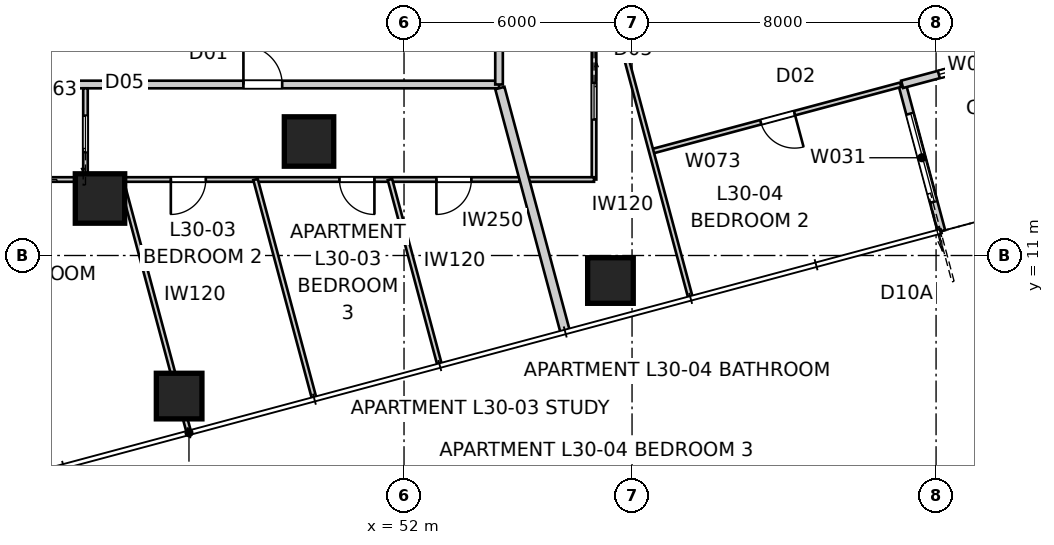
"""IFC4 building model, lengths in metres.
Left out: names, types, materials, properties, quantities, classifications, styles, units other than length and angle.
Written with IfcOpenShell. Run it as: python <this file> out.ifc"""

import sys

from ifc_helpers import new_model, si_unit, direction, frame, frame_2d, origin, origin_2d, place, context, subcontext, project, spatial, rectangle, extrude, element, fill, save


model = new_model("IFC4")
c1 = context("Model", 3, precision=1e-05, world=origin(), true_north=direction((0.0, 1.0)))
c2 = subcontext(c1, "Body", "Model", "MODEL_VIEW")
j1 = project(units=[si_unit("LENGTHUNIT", "METRE"), si_unit("PLANEANGLEUNIT", "RADIAN")], contexts=[c1])
p1 = place(None, origin())
s1 = spatial("IfcSite", under=j1, at=p1, CompositionType="ELEMENT")
p2 = place(p1, origin())
s2 = spatial("IfcBuilding", under=s1, at=p2, CompositionType="ELEMENT")
p3 = place(p2, frame((0.0, 0.0, 111.6)))
s3 = spatial("IfcBuildingStorey", under=s2, at=p3, CompositionType="ELEMENT", Elevation=111.6)
for number, where, z_axis, x_axis in (
    (1, (46.082, 7.301, -0.15), (0.0, 0.0, 1.0), (1.0, 0.0, 0.0)),
    (2, (57.432, 10.342, -0.15), (0.0, 0.0, 1.0), (1.0, 0.0, 0.0)),
):
    element("IfcColumn", number, at=place(p3, frame(where, z_axis=z_axis, x_axis=x_axis)), inside=s3, PredefinedType="COLUMN", context=c2, shape_type="SweptSolid", body=[
        extrude(rectangle(XDim=1.2, YDim=1.2, at=origin_2d()), origin(), (0.0, 0.0, 1.0), 3.55),
    ])
for number, where, z_axis, x_axis in (
    (3, (44.0, 12.5, 0.0), (0.0, 0.0, 1.0), (1.0, 0.0, 0.0)),
    (4, (49.5, 14.0, 0.0), (0.0, 0.0, 1.0), (1.0, 0.0, 0.0)),
):
    element("IfcColumn", number, at=place(p3, frame(where, z_axis=z_axis, x_axis=x_axis)), inside=s3, PredefinedType="COLUMN", context=c2, shape_type="SweptSolid", body=[
        extrude(rectangle(XDim=1.3, YDim=1.3, at=origin_2d()), origin(), (0.0, 0.0, 1.0), 3.4),
    ])
p4 = place(p3, frame((66.143, 11.641, 0.0), z_axis=(0.0, 0.0, 1.0), x_axis=(-0.258843877716, 0.965919172068, 0.0)))
e5 = element("IfcWall", 5, at=p4, inside=s3, PredefinedType="SOLIDWALL", context=c2, shape_type="SweptSolid", body=[
    extrude(rectangle(XDim=4.0, YDim=0.2, at=frame_2d((2.0, 0.0))), origin(), (0.0, 0.0, 1.0), 3.25),
])
p5 = place(p4, frame((0.8, 0.0, 0.0)))
e6 = element("IfcOpeningElement", 6, at=p5, cuts=e5, PredefinedType="OPENING", context=c2, shape_type="SweptSolid", body=[
    extrude(rectangle(XDim=2.4, YDim=2.1, at=frame_2d((1.2, 1.05))), frame((0.0, 0.11, 0.0), z_axis=(0.0, -1.0, 0.0), x_axis=(1.0, 0.0, 0.0)), (0.0, 0.0, 1.0), 0.22),
])
p6 = place(p3, frame((65.107, 15.504, 0.0), z_axis=(0.0, 0.0, 1.0), x_axis=(0.965934430412, 0.258786931944, 0.0)))
e7 = element("IfcWall", 7, at=p6, inside=s3, PredefinedType="SOLIDWALL", context=c2, shape_type="SweptSolid", body=[
    extrude(rectangle(XDim=4.0, YDim=0.2, at=frame_2d((2.0, 0.0))), origin(), (0.0, 0.0, 1.0), 3.25),
])
p7 = place(p6, frame((1.0, 0.0, 0.45)))
e8 = element("IfcOpeningElement", 8, at=p7, cuts=e7, PredefinedType="OPENING", context=c2, shape_type="SweptSolid", body=[
    extrude(rectangle(XDim=2.0, YDim=1.8, at=frame_2d((1.0, 0.9))), frame((0.0, 0.11, 0.0), z_axis=(0.0, -1.0, 0.0), x_axis=(1.0, 0.0, 0.0)), (0.0, 0.0, 1.0), 0.22),
])
p8 = place(p3, frame((26.3, 15.5, 0.0), z_axis=(0.0, 0.0, 1.0), x_axis=(1.0, 0.0, 0.0)))
e9 = element("IfcWall", 9, at=p8, inside=s3, PredefinedType="PARTITIONING", context=c2, shape_type="SweptSolid", body=[
    extrude(rectangle(XDim=28.2, YDim=0.2, at=frame_2d((14.1, 0.0))), origin(), (0.0, 0.0, 1.0), 3.25),
])
p9 = place(p8, frame((21.474, 0.0, 0.0)))
e10 = element("IfcOpeningElement", 10, at=p9, cuts=e9, PredefinedType="OPENING", context=c2, shape_type="SweptSolid", body=[
    extrude(rectangle(XDim=1.02, YDim=2.34, at=frame_2d((0.51, 1.17))), frame((0.0, 0.11, 0.0), z_axis=(0.0, -1.0, 0.0), x_axis=(1.0, 0.0, 0.0)), (0.0, 0.0, 1.0), 0.22),
])
p10 = place(p8, frame((1.353, 0.0, 0.0)))
e11 = element("IfcOpeningElement", 11, at=p10, cuts=e9, PredefinedType="OPENING", context=c2, shape_type="SweptSolid", body=[
    extrude(rectangle(XDim=1.02, YDim=2.1, at=frame_2d((0.51, 1.05))), frame((0.0, 0.11, 0.0), z_axis=(0.0, -1.0, 0.0), x_axis=(1.0, 0.0, 0.0)), (0.0, 0.0, 1.0), 0.22),
])
p11 = place(p3, frame((54.5, 15.5, 0.0), z_axis=(0.0, 0.0, 1.0), x_axis=(0.0, 1.0, 0.0)))
e12 = element("IfcWall", 12, at=p11, inside=s3, PredefinedType="PARTITIONING", context=c2, shape_type="SweptSolid", body=[
    extrude(rectangle(XDim=29.0, YDim=0.2, at=frame_2d((14.5, 0.0))), origin(), (0.0, 0.0, 1.0), 3.25),
])
p12 = place(p11, frame((24.76, 0.0, 0.0)))
e13 = element("IfcOpeningElement", 13, at=p12, cuts=e12, PredefinedType="OPENING", context=c2, shape_type="SweptSolid", body=[
    extrude(rectangle(XDim=1.02, YDim=2.1, at=frame_2d((0.51, 1.05))), frame((0.0, 0.11, 0.0), z_axis=(0.0, -1.0, 0.0), x_axis=(1.0, 0.0, 0.0)), (0.0, 0.0, 1.0), 0.22),
])
p13 = place(p11, frame((5.829, 0.0, 0.0)))
e14 = element("IfcOpeningElement", 14, at=p13, cuts=e12, PredefinedType="OPENING", context=c2, shape_type="SweptSolid", body=[
    extrude(rectangle(XDim=1.02, YDim=2.34, at=frame_2d((0.51, 1.17))), frame((0.0, 0.11, 0.0), z_axis=(0.0, -1.0, 0.0), x_axis=(1.0, 0.0, 0.0)), (0.0, 0.0, 1.0), 0.22),
])
p14 = place(p11, frame((9.559, 0.0, 0.0)))
e15 = element("IfcOpeningElement", 15, at=p14, cuts=e12, PredefinedType="OPENING", context=c2, shape_type="SweptSolid", body=[
    extrude(rectangle(XDim=1.02, YDim=2.34, at=frame_2d((0.51, 1.17))), frame((0.0, 0.11, 0.0), z_axis=(0.0, -1.0, 0.0), x_axis=(1.0, 0.0, 0.0)), (0.0, 0.0, 1.0), 0.22),
])
p15 = place(p3, frame((56.242, 8.988, 0.0), z_axis=(0.0, 0.0, 1.0), x_axis=(-0.25880587229, 0.965929355837, 0.0)))
e16 = element("IfcWall", 16, at=p15, inside=s3, PredefinedType="PARTITIONING", context=c2, shape_type="SweptSolid", body=[
    extrude(rectangle(XDim=6.645, YDim=0.25, at=frame_2d((3.322, 0.0))), origin(), (0.0, 0.0, 1.0), 3.25),
])
p16 = place(p3, frame((55.046, 13.0, 0.0), z_axis=(0.0, 0.0, 1.0), x_axis=(-1.0, 0.0, 0.0)))
e17 = element("IfcWall", 17, at=p16, inside=s3, PredefinedType="PARTITIONING", context=c2, shape_type="SweptSolid", body=[
    extrude(rectangle(XDim=23.693, YDim=0.12, at=frame_2d((11.846, 0.0))), origin(), (0.0, 0.0, 1.0), 2.55),
])
p17 = place(p16, frame((8.262, 0.0, 0.0)))
e18 = element("IfcOpeningElement", 18, at=p17, cuts=e17, PredefinedType="OPENING", context=c2, shape_type="SweptSolid", body=[
    extrude(rectangle(XDim=0.92, YDim=2.34, at=frame_2d((0.46, 1.17))), frame((0.0, 0.07, 0.0), z_axis=(0.0, -1.0, 0.0), x_axis=(1.0, 0.0, 0.0)), (0.0, 0.0, 1.0), 0.14),
])
p18 = place(p16, frame((3.825, 0.0, 0.0)))
e19 = element("IfcOpeningElement", 19, at=p18, cuts=e17, PredefinedType="OPENING", context=c2, shape_type="SweptSolid", body=[
    extrude(rectangle(XDim=0.92, YDim=2.34, at=frame_2d((0.46, 1.17))), frame((0.0, 0.07, 0.0), z_axis=(0.0, -1.0, 0.0), x_axis=(1.0, 0.0, 0.0)), (0.0, 0.0, 1.0), 0.14),
])
p19 = place(p16, frame((1.274, 0.0, 0.0)))
e20 = element("IfcOpeningElement", 20, at=p19, cuts=e17, PredefinedType="OPENING", context=c2, shape_type="SweptSolid", body=[
    extrude(rectangle(XDim=0.92, YDim=2.34, at=frame_2d((0.46, 1.17))), frame((0.0, 0.07, 0.0), z_axis=(0.0, -1.0, 0.0), x_axis=(1.0, 0.0, 0.0)), (0.0, 0.0, 1.0), 0.14),
])
p20 = place(p16, frame((13.041, 0.0, 0.0)))
e21 = element("IfcOpeningElement", 21, at=p20, cuts=e17, PredefinedType="OPENING", context=c2, shape_type="SweptSolid", body=[
    extrude(rectangle(XDim=0.96, YDim=2.1, at=frame_2d((0.48, 1.05))), frame((0.0, 0.07, 0.0), z_axis=(0.0, -1.0, 0.0), x_axis=(1.0, 0.0, 0.0)), (0.0, 0.0, 1.0), 0.14),
])
p21 = place(p16, frame((21.917, 0.0, 0.0)))
e22 = element("IfcOpeningElement", 22, at=p21, cuts=e17, PredefinedType="OPENING", context=c2, shape_type="SweptSolid", body=[
    extrude(rectangle(XDim=0.96, YDim=2.1, at=frame_2d((0.48, 1.05))), frame((0.0, 0.07, 0.0), z_axis=(0.0, -1.0, 0.0), x_axis=(1.0, 0.0, 0.0)), (0.0, 0.0, 1.0), 0.14),
])
p22 = place(p3, frame((43.618, 13.0, 0.0), z_axis=(0.0, 0.0, 1.0), x_axis=(0.0, 1.0, 0.0)))
e23 = element("IfcWall", 23, at=p22, inside=s3, PredefinedType="PARTITIONING", context=c2, shape_type="SweptSolid", body=[
    extrude(rectangle(XDim=2.4, YDim=0.12, at=frame_2d((1.2, 0.0))), origin(), (0.0, 0.0, 1.0), 3.25),
])
p23 = place(p22, frame((0.72, 0.0, 0.0)))
e24 = element("IfcOpeningElement", 24, at=p23, cuts=e23, PredefinedType="OPENING", context=c2, shape_type="SweptSolid", body=[
    extrude(rectangle(XDim=0.96, YDim=2.1, at=frame_2d((0.48, 1.05))), frame((0.0, 0.07, 0.0), z_axis=(0.0, -1.0, 0.0), x_axis=(1.0, 0.0, 0.0)), (0.0, 0.0, 1.0), 0.14),
])
p24 = place(p3, frame((44.555, 13.0, 0.0), z_axis=(0.0, 0.0, 1.0), x_axis=(0.258829770556, -0.965922952349, 0.0)))
e25 = element("IfcWall", 25, at=p24, inside=s3, PredefinedType="PARTITIONING", context=c2, shape_type="SweptSolid", body=[
    extrude(rectangle(XDim=6.86, YDim=0.12, at=frame_2d((3.43, 0.0))), origin(), (0.0, 0.0, 1.0), 3.25),
])
p25 = place(p3, frame((48.092, 13.0, 0.0), z_axis=(0.0, 0.0, 1.0), x_axis=(0.258812722515, -0.965927520399, 0.0)))
e26 = element("IfcWall", 26, at=p25, inside=s3, PredefinedType="PARTITIONING", context=c2, shape_type="SweptSolid", body=[
    extrude(rectangle(XDim=5.945, YDim=0.12, at=frame_2d((2.972, 0.0))), origin(), (0.0, 0.0, 1.0), 3.25),
])
p26 = place(p3, frame((51.63, 13.0, 0.0), z_axis=(0.0, 0.0, 1.0), x_axis=(0.258789467631, -0.965933751063, 0.0)))
e27 = element("IfcWall", 27, at=p26, inside=s3, PredefinedType="PARTITIONING", context=c2, shape_type="SweptSolid", body=[
    extrude(rectangle(XDim=5.029, YDim=0.12, at=frame_2d((2.515, 0.0))), origin(), (0.0, 0.0, 1.0), 3.25),
])
p27 = place(p3, frame((57.0, 47.0, 0.0), z_axis=(0.0, 0.0, 1.0), x_axis=(0.0, -1.0, 0.0)))
e28 = element("IfcWall", 28, at=p27, inside=s3, PredefinedType="PARTITIONING", context=c2, shape_type="SweptSolid", body=[
    extrude(rectangle(XDim=34.0, YDim=0.12, at=frame_2d((17.0, 0.0))), origin(), (0.0, 0.0, 1.0), 2.55),
])
p28 = place(p27, frame((8.23, 0.0, 0.0)))
e29 = element("IfcOpeningElement", 29, at=p28, cuts=e28, PredefinedType="OPENING", context=c2, shape_type="SweptSolid", body=[
    extrude(rectangle(XDim=0.92, YDim=2.34, at=frame_2d((0.46, 1.17))), frame((0.0, 0.07, 0.0), z_axis=(0.0, -1.0, 0.0), x_axis=(1.0, 0.0, 0.0)), (0.0, 0.0, 1.0), 0.14),
])
p29 = place(p27, frame((3.192, 0.0, 0.0)))
e30 = element("IfcOpeningElement", 30, at=p29, cuts=e28, PredefinedType="OPENING", context=c2, shape_type="SweptSolid", body=[
    extrude(rectangle(XDim=0.92, YDim=2.34, at=frame_2d((0.46, 1.17))), frame((0.0, 0.07, 0.0), z_axis=(0.0, -1.0, 0.0), x_axis=(1.0, 0.0, 0.0)), (0.0, 0.0, 1.0), 0.14),
])
p30 = place(p27, frame((24.391, 0.0, 0.0)))
e31 = element("IfcOpeningElement", 31, at=p30, cuts=e28, PredefinedType="OPENING", context=c2, shape_type="SweptSolid", body=[
    extrude(rectangle(XDim=0.92, YDim=2.34, at=frame_2d((0.46, 1.17))), frame((0.0, 0.07, 0.0), z_axis=(0.0, -1.0, 0.0), x_axis=(1.0, 0.0, 0.0)), (0.0, 0.0, 1.0), 0.14),
])
p31 = place(p27, frame((21.702, 0.0, 0.0)))
e32 = element("IfcOpeningElement", 32, at=p31, cuts=e28, PredefinedType="OPENING", context=c2, shape_type="SweptSolid", body=[
    extrude(rectangle(XDim=0.92, YDim=2.34, at=frame_2d((0.46, 1.17))), frame((0.0, 0.07, 0.0), z_axis=(0.0, -1.0, 0.0), x_axis=(1.0, 0.0, 0.0)), (0.0, 0.0, 1.0), 0.14),
])
p32 = place(p27, frame((31.459, 0.0, 0.0)))
e33 = element("IfcOpeningElement", 33, at=p32, cuts=e28, PredefinedType="OPENING", context=c2, shape_type="SweptSolid", body=[
    extrude(rectangle(XDim=0.96, YDim=2.1, at=frame_2d((0.48, 1.05))), frame((0.0, 0.07, 0.0), z_axis=(0.0, -1.0, 0.0), x_axis=(1.0, 0.0, 0.0)), (0.0, 0.0, 1.0), 0.14),
])
p33 = place(p27, frame((13.759, 0.0, 0.0)))
e34 = element("IfcOpeningElement", 34, at=p33, cuts=e28, PredefinedType="OPENING", context=c2, shape_type="SweptSolid", body=[
    extrude(rectangle(XDim=0.96, YDim=2.1, at=frame_2d((0.48, 1.05))), frame((0.0, 0.07, 0.0), z_axis=(0.0, -1.0, 0.0), x_axis=(1.0, 0.0, 0.0)), (0.0, 0.0, 1.0), 0.14),
])
p34 = place(p3, frame((57.0, 13.0, 0.0), z_axis=(0.0, 0.0, 1.0), x_axis=(-1.0, 0.0, 0.0)))
e35 = element("IfcWall", 35, at=p34, inside=s3, PredefinedType="PARTITIONING", context=c2, shape_type="SweptSolid", body=[
    extrude(rectangle(XDim=1.833, YDim=0.12, at=frame_2d((0.917, 0.0))), origin(), (0.0, 0.0, 1.0), 3.25),
])
p35 = place(p3, frame((65.069, 15.494, 0.0), z_axis=(0.0, 0.0, 1.0), x_axis=(-0.965922865286, -0.258830095464, 0.0)))
e36 = element("IfcWall", 36, at=p35, inside=s3, PredefinedType="PARTITIONING", context=c2, shape_type="SweptSolid", body=[
    extrude(rectangle(XDim=6.793, YDim=0.12, at=frame_2d((3.396, 0.0))), origin(), (0.0, 0.0, 1.0), 3.25),
])
p36 = place(p35, frame((2.892, 0.0, 0.0)))
e37 = element("IfcOpeningElement", 37, at=p36, cuts=e36, PredefinedType="OPENING", context=c2, shape_type="SweptSolid", body=[
    extrude(rectangle(XDim=0.92, YDim=2.34, at=frame_2d((0.46, 1.17))), frame((0.0, 0.07, 0.0), z_axis=(0.0, -1.0, 0.0), x_axis=(1.0, 0.0, 0.0)), (0.0, 0.0, 1.0), 0.14),
])
p37 = place(p3, frame((59.532, 9.911, 0.0), z_axis=(0.0, 0.0, 1.0), x_axis=(-0.25881390457, 0.965927203676, 0.0)))
e38 = element("IfcWall", 38, at=p37, inside=s3, PredefinedType="PARTITIONING", context=c2, shape_type="SweptSolid", body=[
    extrude(rectangle(XDim=9.357, YDim=0.12, at=frame_2d((4.678, 0.0))), origin(), (0.0, 0.0, 1.0), 2.638),
])
p38 = place(p5, origin())
e39 = element("IfcDoor", 39, at=p38, inside=s3, OperationType="SLIDING_TO_LEFT", PredefinedType="DOOR", context=c2, shape_type="SweptSolid", body=[
    extrude(rectangle(XDim=2.4, YDim=2.1, at=frame_2d((1.2, 1.05))), frame((0.0, 0.025, 0.0), z_axis=(0.0, -1.0, 0.0), x_axis=(1.0, 0.0, 0.0)), (0.0, 0.0, 1.0), 0.05),
])
fill(e6, e39)
p39 = place(p7, origin())
e40 = element("IfcWindow", 40, at=p39, inside=s3, PartitioningType="SINGLE_PANEL", PredefinedType="WINDOW", context=c2, shape_type="SweptSolid", body=[
    extrude(rectangle(XDim=2.0, YDim=1.8, at=frame_2d((1.0, 0.9))), frame((0.0, 0.03, 0.0), z_axis=(0.0, -1.0, 0.0), x_axis=(1.0, 0.0, 0.0)), (0.0, 0.0, 1.0), 0.06),
])
fill(e8, e40)
p40 = place(p9, origin())
e41 = element("IfcDoor", 41, at=p40, inside=s3, OperationType="SINGLE_SWING_LEFT", PredefinedType="DOOR", context=c2, shape_type="SweptSolid", body=[
    extrude(rectangle(XDim=1.02, YDim=2.34, at=frame_2d((0.51, 1.17))), frame((0.0, 0.025, 0.0), z_axis=(0.0, -1.0, 0.0), x_axis=(1.0, 0.0, 0.0)), (0.0, 0.0, 1.0), 0.05),
])
fill(e10, e41)
p41 = place(p17, origin())
e42 = element("IfcDoor", 42, at=p41, inside=s3, OperationType="SINGLE_SWING_RIGHT", PredefinedType="DOOR", context=c2, shape_type="SweptSolid", body=[
    extrude(rectangle(XDim=0.92, YDim=2.34, at=frame_2d((0.46, 1.17))), frame((0.0, 0.025, 0.0), z_axis=(0.0, -1.0, 0.0), x_axis=(1.0, 0.0, 0.0)), (0.0, 0.0, 1.0), 0.05),
])
fill(e18, e42)
p42 = place(p18, origin())
e43 = element("IfcDoor", 43, at=p42, inside=s3, OperationType="SINGLE_SWING_LEFT", PredefinedType="DOOR", context=c2, shape_type="SweptSolid", body=[
    extrude(rectangle(XDim=0.92, YDim=2.34, at=frame_2d((0.46, 1.17))), frame((0.0, 0.025, 0.0), z_axis=(0.0, -1.0, 0.0), x_axis=(1.0, 0.0, 0.0)), (0.0, 0.0, 1.0), 0.05),
])
fill(e19, e43)
p43 = place(p19, origin())
e44 = element("IfcDoor", 44, at=p43, inside=s3, OperationType="SINGLE_SWING_RIGHT", PredefinedType="DOOR", context=c2, shape_type="SweptSolid", body=[
    extrude(rectangle(XDim=0.92, YDim=2.34, at=frame_2d((0.46, 1.17))), frame((0.0, 0.025, 0.0), z_axis=(0.0, -1.0, 0.0), x_axis=(1.0, 0.0, 0.0)), (0.0, 0.0, 1.0), 0.05),
])
fill(e20, e44)
p44 = place(p23, origin())
e45 = element("IfcDoor", 45, at=p44, inside=s3, OperationType="SLIDING_TO_LEFT", PredefinedType="DOOR", context=c2, shape_type="SweptSolid", body=[
    extrude(rectangle(XDim=0.96, YDim=2.1, at=frame_2d((0.48, 1.05))), frame((0.0, 0.025, 0.0), z_axis=(0.0, -1.0, 0.0), x_axis=(1.0, 0.0, 0.0)), (0.0, 0.0, 1.0), 0.05),
])
fill(e24, e45)
p45 = place(p32, origin())
e46 = element("IfcDoor", 46, at=p45, inside=s3, OperationType="SLIDING_TO_LEFT", PredefinedType="DOOR", context=c2, shape_type="SweptSolid", body=[
    extrude(rectangle(XDim=0.96, YDim=2.1, at=frame_2d((0.48, 1.05))), frame((0.0, 0.025, 0.0), z_axis=(0.0, -1.0, 0.0), x_axis=(1.0, 0.0, 0.0)), (0.0, 0.0, 1.0), 0.05),
])
fill(e33, e46)
p46 = place(p36, origin())
e47 = element("IfcDoor", 47, at=p46, inside=s3, OperationType="SINGLE_SWING_LEFT", PredefinedType="DOOR", context=c2, shape_type="SweptSolid", body=[
    extrude(rectangle(XDim=0.92, YDim=2.34, at=frame_2d((0.46, 1.17))), frame((0.0, 0.025, 0.0), z_axis=(0.0, -1.0, 0.0), x_axis=(1.0, 0.0, 0.0)), (0.0, 0.0, 1.0), 0.05),
])
fill(e37, e47)
save(model, sys.argv[1])
